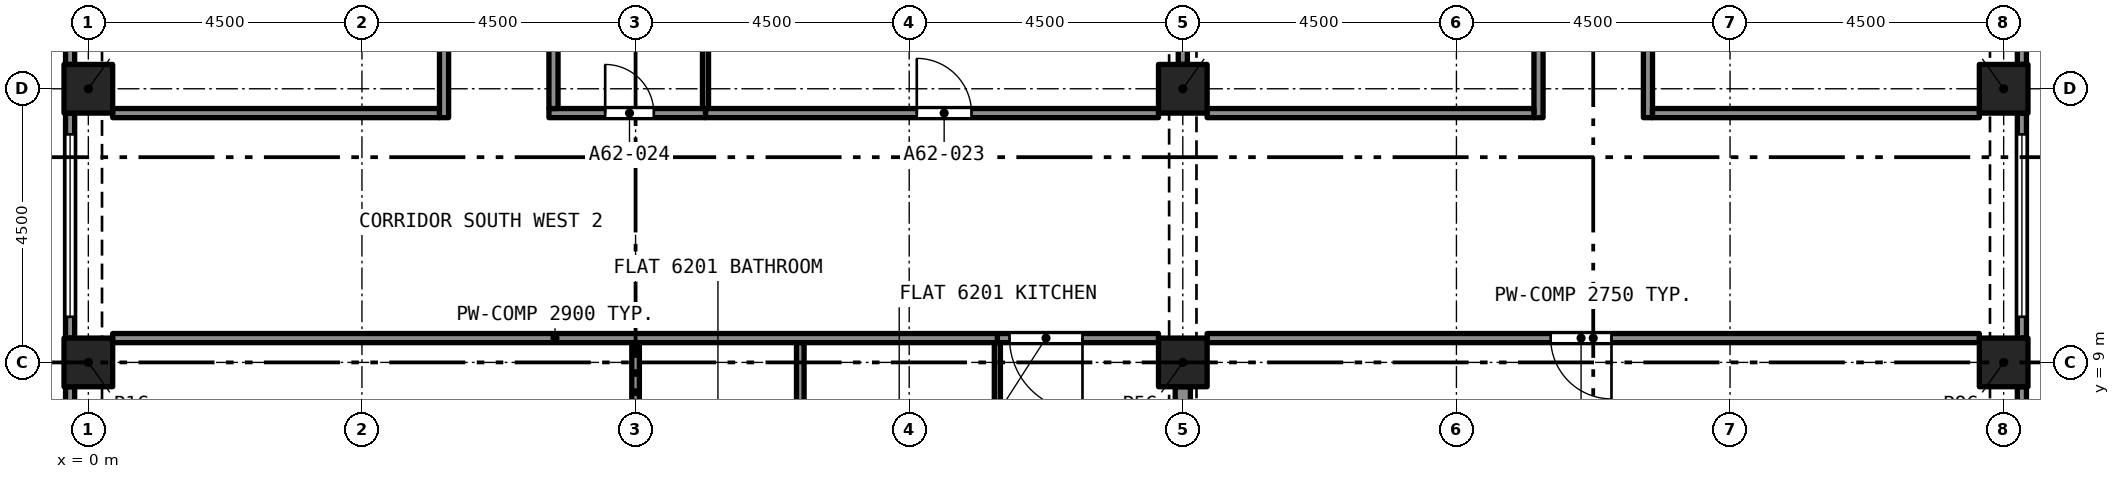
"""IFC4 building model, lengths in metres.
Left out: names, types, materials, properties, quantities, classifications, styles, units other than length and angle.
Written with IfcOpenShell. Run it as: python <this file> out.ifc"""

import sys

from ifc_helpers import new_model, si_unit, direction, frame, frame_2d, origin, origin_2d, place, context, subcontext, project, spatial, rectangle, extrude, element, fill, save


model = new_model("IFC4")
c1 = context("Model", 3, precision=1e-05, world=origin(), true_north=direction((0.0, 1.0)))
c2 = subcontext(c1, "Body", "Model", "MODEL_VIEW")
j1 = project(units=[si_unit("LENGTHUNIT", "METRE"), si_unit("PLANEANGLEUNIT", "RADIAN")], contexts=[c1])
p1 = place(None, origin())
s1 = spatial("IfcSite", under=j1, at=p1, CompositionType="ELEMENT")
p2 = place(p1, origin())
s2 = spatial("IfcBuilding", under=s1, at=p2, CompositionType="ELEMENT")
p3 = place(p2, frame((0.0, 0.0, 222.895)))
s3 = spatial("IfcBuildingStorey", under=s2, at=p3, CompositionType="ELEMENT", Elevation=222.895)
for number, where, z_axis, x_axis in (
    (1, (0.0, 9.0, 0.0), (0.0, 0.0, 1.0), (1.0, 0.0, 0.0)),
    (2, (18.0, 9.0, 0.0), (0.0, 0.0, 1.0), (1.0, 0.0, 0.0)),
    (3, (31.5, 9.0, 0.0), (0.0, 0.0, 1.0), (1.0, 0.0, 0.0)),
    (4, (0.0, 13.5, 0.0), (0.0, 0.0, 1.0), (1.0, 0.0, 0.0)),
    (5, (18.0, 13.5, 0.0), (0.0, 0.0, 1.0), (1.0, 0.0, 0.0)),
    (6, (31.5, 13.5, 0.0), (0.0, 0.0, 1.0), (1.0, 0.0, 0.0)),
):
    element("IfcColumn", number, at=place(p3, frame(where, z_axis=z_axis, x_axis=x_axis)), inside=s3, PredefinedType="COLUMN", context=c2, shape_type="SweptSolid", body=[
        extrude(rectangle(XDim=0.8, YDim=0.8, at=origin_2d()), origin(), (0.0, 0.0, 1.0), 3.2),
    ])
p4 = place(p3, frame((31.8, 8.6, 0.0), z_axis=(0.0, 0.0, 1.0), x_axis=(0.0, -1.0, 0.0)))
e7 = element("IfcWall", 7, at=p4, inside=s3, PredefinedType="SOLIDWALL", context=c2, shape_type="SweptSolid", body=[
    extrude(rectangle(XDim=3.7, YDim=0.15, at=frame_2d((1.85, 0.0))), origin(), (0.0, 0.0, 1.0), 3.2),
])
p5 = place(p4, frame((0.35, 0.0, 0.45)))
e8 = element("IfcOpeningElement", 8, at=p5, cuts=e7, PredefinedType="OPENING", context=c2, shape_type="SweptSolid", body=[
    extrude(rectangle(XDim=3.0, YDim=1.95, at=frame_2d((1.5, 0.975))), frame((0.0, 0.085, 0.0), z_axis=(0.0, -1.0, 0.0), x_axis=(1.0, 0.0, 0.0)), (0.0, 0.0, 1.0), 0.17),
])
p6 = place(p3, frame((31.8, 13.1, 0.0), z_axis=(0.0, 0.0, 1.0), x_axis=(0.0, -1.0, 0.0)))
e9 = element("IfcWall", 9, at=p6, inside=s3, PredefinedType="SOLIDWALL", context=c2, shape_type="SweptSolid", body=[
    extrude(rectangle(XDim=3.7, YDim=0.15, at=frame_2d((1.85, 0.0))), origin(), (0.0, 0.0, 1.0), 3.2),
])
p7 = place(p6, frame((0.35, 0.0, 0.45)))
e10 = element("IfcOpeningElement", 10, at=p7, cuts=e9, PredefinedType="OPENING", context=c2, shape_type="SweptSolid", body=[
    extrude(rectangle(XDim=3.0, YDim=1.95, at=frame_2d((1.5, 0.975))), frame((0.0, 0.085, 0.0), z_axis=(0.0, -1.0, 0.0), x_axis=(1.0, 0.0, 0.0)), (0.0, 0.0, 1.0), 0.17),
])
p8 = place(p3, frame((31.8, 17.6, 0.0), z_axis=(0.0, 0.0, 1.0), x_axis=(0.0, -1.0, 0.0)))
e11 = element("IfcWall", 11, at=p8, inside=s3, PredefinedType="SOLIDWALL", context=c2, shape_type="SweptSolid", body=[
    extrude(rectangle(XDim=3.7, YDim=0.15, at=frame_2d((1.85, 0.0))), origin(), (0.0, 0.0, 1.0), 3.2),
])
p9 = place(p8, frame((0.35, 0.0, 0.45)))
e12 = element("IfcOpeningElement", 12, at=p9, cuts=e11, PredefinedType="OPENING", context=c2, shape_type="SweptSolid", body=[
    extrude(rectangle(XDim=3.0, YDim=1.95, at=frame_2d((1.5, 0.975))), frame((0.0, 0.085, 0.0), z_axis=(0.0, -1.0, 0.0), x_axis=(1.0, 0.0, 0.0)), (0.0, 0.0, 1.0), 0.17),
])
p10 = place(p3, frame((-0.3, 13.9, 0.0), z_axis=(0.0, 0.0, 1.0), x_axis=(0.0, 1.0, 0.0)))
e13 = element("IfcWall", 13, at=p10, inside=s3, PredefinedType="SOLIDWALL", context=c2, shape_type="SweptSolid", body=[
    extrude(rectangle(XDim=3.7, YDim=0.15, at=frame_2d((1.85, 0.0))), origin(), (0.0, 0.0, 1.0), 3.2),
])
p11 = place(p10, frame((0.35, 0.0, 0.45)))
e14 = element("IfcOpeningElement", 14, at=p11, cuts=e13, PredefinedType="OPENING", context=c2, shape_type="SweptSolid", body=[
    extrude(rectangle(XDim=3.0, YDim=1.95, at=frame_2d((1.5, 0.975))), frame((0.0, 0.085, 0.0), z_axis=(0.0, -1.0, 0.0), x_axis=(1.0, 0.0, 0.0)), (0.0, 0.0, 1.0), 0.17),
])
p12 = place(p3, frame((-0.3, 9.4, 0.0), z_axis=(0.0, 0.0, 1.0), x_axis=(0.0, 1.0, 0.0)))
e15 = element("IfcWall", 15, at=p12, inside=s3, PredefinedType="SOLIDWALL", context=c2, shape_type="SweptSolid", body=[
    extrude(rectangle(XDim=3.7, YDim=0.15, at=frame_2d((1.85, 0.0))), origin(), (0.0, 0.0, 1.0), 3.2),
])
p13 = place(p12, frame((0.35, 0.0, 0.45)))
e16 = element("IfcOpeningElement", 16, at=p13, cuts=e15, PredefinedType="OPENING", context=c2, shape_type="SweptSolid", body=[
    extrude(rectangle(XDim=3.0, YDim=1.95, at=frame_2d((1.5, 0.975))), frame((0.0, 0.085, 0.0), z_axis=(0.0, -1.0, 0.0), x_axis=(1.0, 0.0, 0.0)), (0.0, 0.0, 1.0), 0.17),
])
p14 = place(p3, frame((-0.3, 4.9, 0.0), z_axis=(0.0, 0.0, 1.0), x_axis=(0.0, 1.0, 0.0)))
e17 = element("IfcWall", 17, at=p14, inside=s3, PredefinedType="SOLIDWALL", context=c2, shape_type="SweptSolid", body=[
    extrude(rectangle(XDim=3.7, YDim=0.15, at=frame_2d((1.85, 0.0))), origin(), (0.0, 0.0, 1.0), 3.2),
])
p15 = place(p14, frame((0.35, 0.0, 0.45)))
e18 = element("IfcOpeningElement", 18, at=p15, cuts=e17, PredefinedType="OPENING", context=c2, shape_type="SweptSolid", body=[
    extrude(rectangle(XDim=3.0, YDim=1.95, at=frame_2d((1.5, 0.975))), frame((0.0, 0.085, 0.0), z_axis=(0.0, -1.0, 0.0), x_axis=(1.0, 0.0, 0.0)), (0.0, 0.0, 1.0), 0.17),
])
p16 = place(p3, frame((11.709, 5.282, 0.0), z_axis=(0.0, 0.0, 1.0), x_axis=(0.0, 1.0, 0.0)))
e19 = element("IfcWall", 19, at=p16, inside=s3, PredefinedType="PARTITIONING", context=c2, shape_type="SweptSolid", body=[
    extrude(rectangle(XDim=4.042, YDim=0.125, at=frame_2d((2.021, 0.0))), origin(), (0.0, 0.0, 1.0), 2.9),
])
p17 = place(p3, frame((9.0, 5.22, 0.0), z_axis=(0.0, 0.0, 1.0), x_axis=(0.0, 1.0, 0.0)))
e20 = element("IfcWall", 20, at=p17, inside=s3, PredefinedType="PARTITIONING", context=c2, shape_type="SweptSolid", body=[
    extrude(rectangle(XDim=4.105, YDim=0.125, at=frame_2d((2.052, 0.0))), origin(), (0.0, 0.0, 1.0), 2.9),
])
p18 = place(p3, frame((14.95, 5.27, 0.0), z_axis=(0.0, 0.0, 1.0), x_axis=(0.0, 1.0, 0.0)))
e21 = element("IfcWall", 21, at=p18, inside=s3, PredefinedType="PARTITIONING", context=c2, shape_type="SweptSolid", body=[
    extrude(rectangle(XDim=4.055, YDim=0.1, at=frame_2d((2.027, 0.0))), origin(), (0.0, 0.0, 1.0), 2.9),
])
p19 = place(p3, frame((18.0, 4.9, 0.0), z_axis=(0.0, 0.0, 1.0), x_axis=(0.0, 1.0, 0.0)))
e22 = element("IfcWall", 22, at=p19, inside=s3, PredefinedType="PARTITIONING", context=c2, shape_type="SweptSolid", body=[
    extrude(rectangle(XDim=3.7, YDim=0.25, at=frame_2d((1.85, 0.0))), origin(), (0.0, 0.0, 1.0), 2.38),
])
p20 = place(p3, frame((17.6, 9.4, 0.0), z_axis=(0.0, 0.0, 1.0), x_axis=(-1.0, 0.0, 0.0)))
e23 = element("IfcWall", 23, at=p20, inside=s3, PredefinedType="PARTITIONING", context=c2, shape_type="SweptSolid", body=[
    extrude(rectangle(XDim=2.65, YDim=0.15, at=frame_2d((1.325, 0.0))), origin(), (0.0, 0.0, 1.0), 2.9),
])
p21 = place(p20, frame((1.25, 0.0, 0.0)))
e24 = element("IfcOpeningElement", 24, at=p21, cuts=e23, PredefinedType="OPENING", context=c2, shape_type="SweptSolid", body=[
    extrude(rectangle(XDim=1.2, YDim=2.4, at=frame_2d((0.6, 1.2))), frame((0.0, 0.085, 0.0), z_axis=(0.0, -1.0, 0.0), x_axis=(1.0, 0.0, 0.0)), (0.0, 0.0, 1.0), 0.17),
])
p22 = place(p3, frame((0.4, 9.4, 0.0), z_axis=(0.0, 0.0, 1.0), x_axis=(1.0, 0.0, 0.0)))
e25 = element("IfcWall", 25, at=p22, inside=s3, PredefinedType="PARTITIONING", context=c2, shape_type="SweptSolid", body=[
    extrude(rectangle(XDim=14.55, YDim=0.15, at=frame_2d((7.275, 0.0))), origin(), (0.0, 0.0, 1.0), 2.9),
])
p23 = place(p3, frame((31.1, 9.4, 0.0), z_axis=(0.0, 0.0, 1.0), x_axis=(-1.0, 0.0, 0.0)))
e26 = element("IfcWall", 26, at=p23, inside=s3, PredefinedType="PARTITIONING", context=c2, shape_type="SweptSolid", body=[
    extrude(rectangle(XDim=12.7, YDim=0.15, at=frame_2d((6.35, 0.0))), origin(), (0.0, 0.0, 1.0), 2.75),
])
p24 = place(p23, frame((6.05, 0.0, 0.0)))
e27 = element("IfcOpeningElement", 27, at=p24, cuts=e26, PredefinedType="OPENING", context=c2, shape_type="SweptSolid", body=[
    extrude(rectangle(XDim=1.0, YDim=2.1, at=frame_2d((0.5, 1.05))), frame((0.0, 0.085, 0.0), z_axis=(0.0, -1.0, 0.0), x_axis=(1.0, 0.0, 0.0)), (0.0, 0.0, 1.0), 0.17),
])
p25 = place(p3, frame((23.85, 13.025, 0.0), z_axis=(0.0, 0.0, 1.0), x_axis=(0.0, 1.0, 0.0)))
e28 = element("IfcWall", 28, at=p25, inside=s3, PredefinedType="PARTITIONING", context=c2, shape_type="SweptSolid", body=[
    extrude(rectangle(XDim=9.55, YDim=0.15, at=frame_2d((4.775, 0.0))), origin(), (0.0, 0.0, 1.0), 2.75),
])
p26 = place(p25, frame((4.275, 0.0, 0.0)))
e29 = element("IfcOpeningElement", 29, at=p26, cuts=e28, PredefinedType="OPENING", context=c2, shape_type="SweptSolid", body=[
    extrude(rectangle(XDim=1.0, YDim=2.1, at=frame_2d((0.5, 1.05))), frame((0.0, 0.085, 0.0), z_axis=(0.0, -1.0, 0.0), x_axis=(1.0, 0.0, 0.0)), (0.0, 0.0, 1.0), 0.17),
])
p27 = place(p3, frame((25.65, 22.575, 0.0), z_axis=(0.0, 0.0, 1.0), x_axis=(0.0, -1.0, 0.0)))
e30 = element("IfcWall", 30, at=p27, inside=s3, PredefinedType="PARTITIONING", context=c2, shape_type="SweptSolid", body=[
    extrude(rectangle(XDim=9.55, YDim=0.15, at=frame_2d((4.775, 0.0))), origin(), (0.0, 0.0, 1.0), 2.75),
])
p28 = place(p27, frame((4.275, 0.0, 0.0)))
e31 = element("IfcOpeningElement", 31, at=p28, cuts=e30, PredefinedType="OPENING", context=c2, shape_type="SweptSolid", body=[
    extrude(rectangle(XDim=1.0, YDim=2.1, at=frame_2d((0.5, 1.05))), frame((0.0, 0.085, 0.0), z_axis=(0.0, -1.0, 0.0), x_axis=(1.0, 0.0, 0.0)), (0.0, 0.0, 1.0), 0.17),
])
for number, where, z_axis, x_axis in (
    (32, (18.4, 13.1, 0.0), (0.0, 0.0, 1.0), (1.0, 0.0, 0.0)),
    (33, (25.725, 13.1, 0.0), (0.0, 0.0, 1.0), (1.0, 0.0, 0.0)),
):
    element("IfcWall", number, at=place(p3, frame(where, z_axis=z_axis, x_axis=x_axis)), inside=s3, PredefinedType="PARTITIONING", context=c2, shape_type="SweptSolid", body=[
        extrude(rectangle(XDim=5.375, YDim=0.15, at=frame_2d((2.688, 0.0))), origin(), (0.0, 0.0, 1.0), 2.75),
    ])
p29 = place(p3, frame((10.15, 13.1, 0.0), z_axis=(0.0, 0.0, 1.0), x_axis=(1.0, 0.0, 0.0)))
e34 = element("IfcWall", 34, at=p29, inside=s3, PredefinedType="PARTITIONING", context=c2, shape_type="SweptSolid", body=[
    extrude(rectangle(XDim=7.45, YDim=0.15, at=frame_2d((3.725, 0.0))), origin(), (0.0, 0.0, 1.0), 2.9),
])
p30 = place(p29, frame((3.475, 0.0, 0.0)))
e35 = element("IfcOpeningElement", 35, at=p30, cuts=e34, PredefinedType="OPENING", context=c2, shape_type="SweptSolid", body=[
    extrude(rectangle(XDim=0.9, YDim=2.1, at=frame_2d((0.45, 1.05))), frame((0.0, 0.085, 0.0), z_axis=(0.0, -1.0, 0.0), x_axis=(1.0, 0.0, 0.0)), (0.0, 0.0, 1.0), 0.17),
])
p31 = place(p3, frame((7.575, 13.1, 0.0), z_axis=(0.0, 0.0, 1.0), x_axis=(1.0, 0.0, 0.0)))
e36 = element("IfcWall", 36, at=p31, inside=s3, PredefinedType="PARTITIONING", context=c2, shape_type="SweptSolid", body=[
    extrude(rectangle(XDim=2.575, YDim=0.15, at=frame_2d((1.288, 0.0))), origin(), (0.0, 0.0, 1.0), 2.9),
])
p32 = place(p31, frame((0.925, 0.0, 0.0)))
e37 = element("IfcOpeningElement", 37, at=p32, cuts=e36, PredefinedType="OPENING", context=c2, shape_type="SweptSolid", body=[
    extrude(rectangle(XDim=0.8, YDim=2.1, at=frame_2d((0.4, 1.05))), frame((0.0, 0.085, 0.0), z_axis=(0.0, -1.0, 0.0), x_axis=(1.0, 0.0, 0.0)), (0.0, 0.0, 1.0), 0.17),
])
p33 = place(p3, frame((0.4, 13.1, 0.0), z_axis=(0.0, 0.0, 1.0), x_axis=(1.0, 0.0, 0.0)))
e38 = element("IfcWall", 38, at=p33, inside=s3, PredefinedType="PARTITIONING", context=c2, shape_type="SweptSolid", body=[
    extrude(rectangle(XDim=5.375, YDim=0.15, at=frame_2d((2.688, 0.0))), origin(), (0.0, 0.0, 1.0), 2.9),
])
p34 = place(p3, frame((18.0, 13.9, 0.0), z_axis=(0.0, 0.0, 1.0), x_axis=(0.0, 1.0, 0.0)))
e39 = element("IfcWall", 39, at=p34, inside=s3, PredefinedType="PARTITIONING", context=c2, shape_type="SweptSolid", body=[
    extrude(rectangle(XDim=1.8, YDim=0.15, at=frame_2d((0.9, 0.0))), origin(), (0.0, 0.0, 1.0), 2.38),
])
p35 = place(p3, frame((7.65, 13.175, 0.0), z_axis=(0.0, 0.0, 1.0), x_axis=(0.0, 1.0, 0.0)))
e40 = element("IfcWall", 40, at=p35, inside=s3, PredefinedType="PARTITIONING", context=c2, shape_type="SweptSolid", body=[
    extrude(rectangle(XDim=2.525, YDim=0.15, at=frame_2d((1.262, 0.0))), origin(), (0.0, 0.0, 1.0), 2.9),
])
p36 = place(p3, frame((5.85, 13.025, 0.0), z_axis=(0.0, 0.0, 1.0), x_axis=(0.0, 1.0, 0.0)))
e41 = element("IfcWall", 41, at=p36, inside=s3, PredefinedType="PARTITIONING", context=c2, shape_type="SweptSolid", body=[
    extrude(rectangle(XDim=9.475, YDim=0.15, at=frame_2d((4.738, 0.0))), origin(), (0.0, 0.0, 1.0), 2.9),
])
p37 = place(p36, frame((4.275, 0.0, 0.0)))
e42 = element("IfcOpeningElement", 42, at=p37, cuts=e41, PredefinedType="OPENING", context=c2, shape_type="SweptSolid", body=[
    extrude(rectangle(XDim=1.0, YDim=2.1, at=frame_2d((0.5, 1.05))), frame((0.0, 0.085, 0.0), z_axis=(0.0, -1.0, 0.0), x_axis=(1.0, 0.0, 0.0)), (0.0, 0.0, 1.0), 0.17),
])
p38 = place(p3, frame((10.15, 13.175, 0.0), z_axis=(0.0, 0.0, 1.0), x_axis=(0.0, 1.0, 0.0)))
e43 = element("IfcWall", 43, at=p38, inside=s3, PredefinedType="PARTITIONING", context=c2, shape_type="SweptSolid", body=[
    extrude(rectangle(XDim=2.45, YDim=0.1, at=frame_2d((1.225, 0.0))), origin(), (0.0, 0.0, 1.0), 2.9),
])
p39 = place(p7, origin())
e44 = element("IfcWindow", 44, at=p39, inside=s3, PartitioningType="SINGLE_PANEL", PredefinedType="WINDOW", context=c2, shape_type="SweptSolid", body=[
    extrude(rectangle(XDim=3.0, YDim=1.95, at=frame_2d((1.5, 0.975))), frame((0.0, 0.03, 0.0), z_axis=(0.0, -1.0, 0.0), x_axis=(1.0, 0.0, 0.0)), (0.0, 0.0, 1.0), 0.06),
])
fill(e10, e44)
p40 = place(p13, origin())
e45 = element("IfcWindow", 45, at=p40, inside=s3, PartitioningType="SINGLE_PANEL", PredefinedType="WINDOW", context=c2, shape_type="SweptSolid", body=[
    extrude(rectangle(XDim=3.0, YDim=1.95, at=frame_2d((1.5, 0.975))), frame((0.0, 0.03, 0.0), z_axis=(0.0, -1.0, 0.0), x_axis=(1.0, 0.0, 0.0)), (0.0, 0.0, 1.0), 0.06),
])
fill(e16, e45)
p41 = place(p21, origin())
e46 = element("IfcDoor", 46, at=p41, inside=s3, OperationType="SINGLE_SWING_RIGHT", PredefinedType="DOOR", context=c2, shape_type="SweptSolid", body=[
    extrude(rectangle(XDim=1.2, YDim=2.4, at=frame_2d((0.6, 1.2))), frame((0.0, 0.025, 0.0), z_axis=(0.0, -1.0, 0.0), x_axis=(1.0, 0.0, 0.0)), (0.0, 0.0, 1.0), 0.05),
])
fill(e24, e46)
p42 = place(p24, origin())
e47 = element("IfcDoor", 47, at=p42, inside=s3, OperationType="SINGLE_SWING_RIGHT", PredefinedType="DOOR", context=c2, shape_type="SweptSolid", body=[
    extrude(rectangle(XDim=1.0, YDim=2.1, at=frame_2d((0.5, 1.05))), frame((0.0, 0.025, 0.0), z_axis=(0.0, -1.0, 0.0), x_axis=(1.0, 0.0, 0.0)), (0.0, 0.0, 1.0), 0.05),
])
fill(e27, e47)
p43 = place(p30, origin())
e48 = element("IfcDoor", 48, at=p43, inside=s3, OperationType="SINGLE_SWING_RIGHT", PredefinedType="DOOR", context=c2, shape_type="SweptSolid", body=[
    extrude(rectangle(XDim=0.9, YDim=2.1, at=frame_2d((0.45, 1.05))), frame((0.0, 0.025, 0.0), z_axis=(0.0, -1.0, 0.0), x_axis=(1.0, 0.0, 0.0)), (0.0, 0.0, 1.0), 0.05),
])
fill(e35, e48)
p44 = place(p32, origin())
e49 = element("IfcDoor", 49, at=p44, inside=s3, OperationType="SINGLE_SWING_RIGHT", PredefinedType="DOOR", context=c2, shape_type="SweptSolid", body=[
    extrude(rectangle(XDim=0.8, YDim=2.1, at=frame_2d((0.4, 1.05))), frame((0.0, 0.025, 0.0), z_axis=(0.0, -1.0, 0.0), x_axis=(1.0, 0.0, 0.0)), (0.0, 0.0, 1.0), 0.05),
])
fill(e37, e49)
save(model, sys.argv[1])
